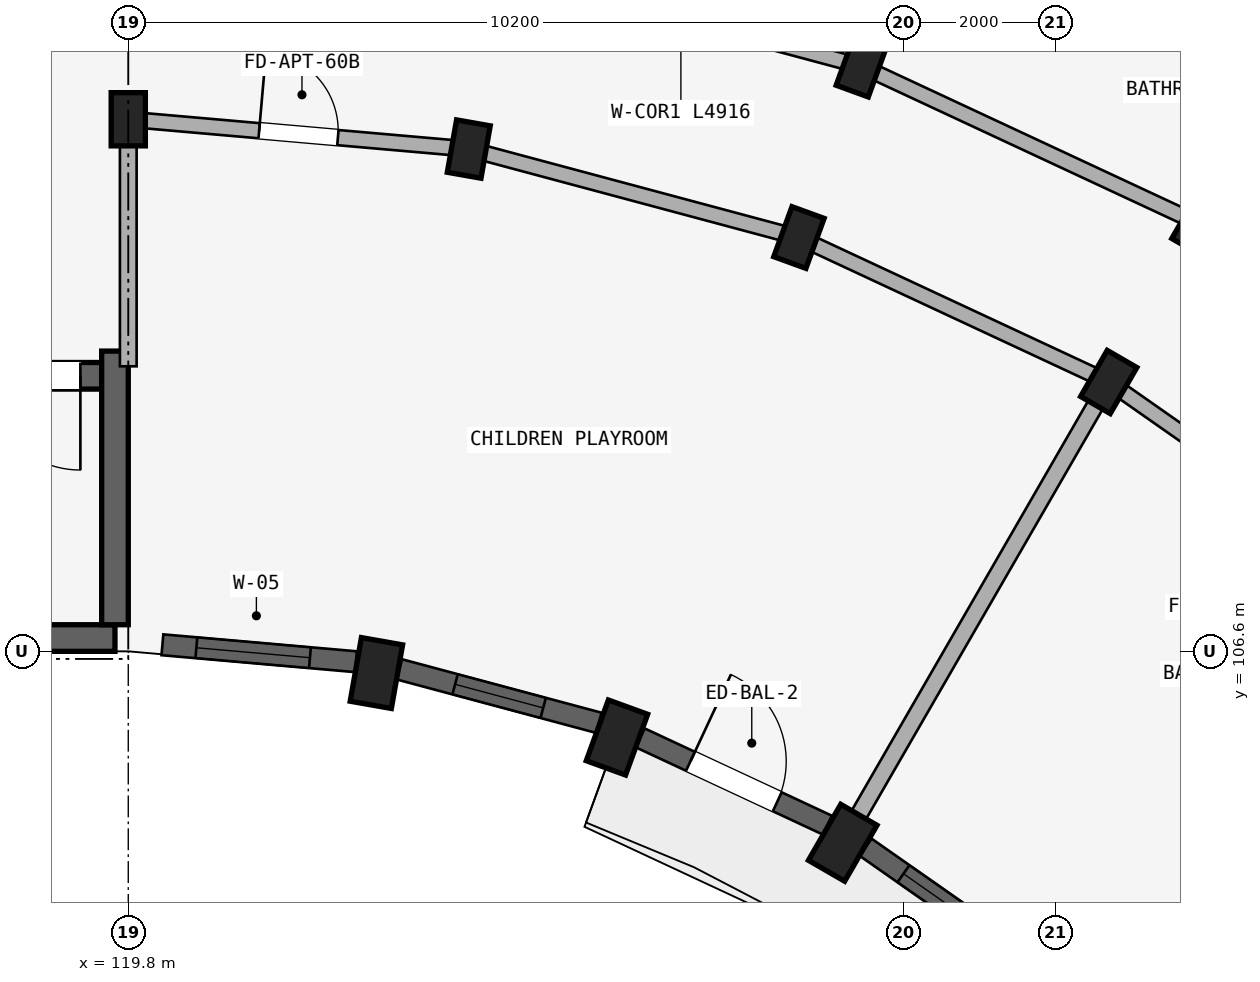
"""IFC4 building model, lengths in metres.
Left out: names, types, materials, properties, quantities, classifications, styles, units other than length and angle.
Written with IfcOpenShell. Run it as: python <this file> out.ifc"""

import sys

from ifc_helpers import new_model, si_unit, direction, frame, frame_2d, origin, origin_2d, place, context, subcontext, project, spatial, rectangle, extrude, element, fill, save


model = new_model("IFC4")
c1 = context("Model", 3, precision=1e-05, world=origin(), true_north=direction((0.0, 1.0)))
c2 = subcontext(c1, "Body", "Model", "MODEL_VIEW")
j1 = project(units=[si_unit("LENGTHUNIT", "METRE"), si_unit("PLANEANGLEUNIT", "RADIAN")], contexts=[c1])
p1 = place(None, origin())
s1 = spatial("IfcSite", under=j1, at=p1, CompositionType="ELEMENT")
p2 = place(p1, origin())
s2 = spatial("IfcBuilding", under=s1, at=p2, CompositionType="ELEMENT")
p3 = place(p2, frame((0.0, 0.0, 15.0)))
s3 = spatial("IfcBuildingStorey", under=s2, at=p3, CompositionType="ELEMENT", Elevation=15.0)
p4 = place(p3, frame((119.625, 106.775, 0.0), z_axis=(0.0, 0.0, 1.0), x_axis=(-1.0, 0.0, 0.0)))
e1 = element("IfcWall", 1, at=p4, inside=s3, PredefinedType="SHEAR", context=c2, shape_type="SweptSolid", body=[
    extrude(rectangle(XDim=8.25, YDim=0.35, at=frame_2d((4.125, 0.0))), origin(), (0.0, 0.0, 1.0), 2.93),
])
p5 = place(p3, frame((119.45, 110.225, 0.0), z_axis=(0.0, 0.0, 1.0), x_axis=(-1.0, 0.0, 0.0)))
e2 = element("IfcWall", 2, at=p5, inside=s3, PredefinedType="SHEAR", context=c2, shape_type="SweptSolid", body=[
    extrude(rectangle(XDim=7.9, YDim=0.35, at=frame_2d((3.95, 0.0))), origin(), (0.0, 0.0, 1.0), 2.93),
])
p6 = place(p5, frame((0.28, 0.0, 0.0)))
e3 = element("IfcOpeningElement", 3, at=p6, cuts=e2, PredefinedType="OPENING", context=c2, shape_type="SweptSolid", body=[
    extrude(rectangle(XDim=1.24, YDim=2.15, at=frame_2d((0.62, 1.075))), frame((0.0, 0.185, 0.0), z_axis=(0.0, -1.0, 0.0), x_axis=(1.0, 0.0, 0.0)), (0.0, 0.0, 1.0), 0.37),
])
p7 = place(p3, frame((119.625, 106.95, 0.0), z_axis=(0.0, 0.0, 1.0), x_axis=(0.0, 1.0, 0.0)))
e4 = element("IfcWall", 4, at=p7, inside=s3, PredefinedType="SHEAR", context=c2, shape_type="SweptSolid", body=[
    extrude(rectangle(XDim=3.6, YDim=0.35, at=frame_2d((1.8, 0.0))), origin(), (0.0, 0.0, 1.0), 2.93),
])
p8 = place(p3, frame((119.8, 113.6, 0.0), z_axis=(0.0, 0.0, 1.0), x_axis=(1.0, 0.0, 0.0)))
e5 = element("IfcColumn", 5, at=p8, inside=s3, PredefinedType="COLUMN", context=c2, shape_type="SweptSolid", body=[
    extrude(rectangle(XDim=0.45, YDim=0.7, at=origin_2d()), origin(), (0.0, 0.0, 1.0), 2.93),
])
p9 = place(p3, frame((123.065, 106.314, 0.0), z_axis=(0.0, 0.0, 1.0), x_axis=(-0.984807753012, 0.173648177667, 0.0)))
e6 = element("IfcColumn", 6, at=p9, inside=s3, PredefinedType="COLUMN", context=c2, shape_type="SweptSolid", body=[
    extrude(rectangle(XDim=0.55, YDim=0.85, at=origin_2d()), origin(), (0.0, 0.0, 1.0), 2.93),
])
p10 = place(p3, frame((124.28, 113.208, 0.0), z_axis=(0.0, 0.0, 1.0), x_axis=(-0.984807753012, 0.173648177667, 0.0)))
e7 = element("IfcColumn", 7, at=p10, inside=s3, PredefinedType="COLUMN", context=c2, shape_type="SweptSolid", body=[
    extrude(rectangle(XDim=0.45, YDim=0.7, at=origin_2d()), origin(), (0.0, 0.0, 1.0), 2.93),
])
p11 = place(p3, frame((126.23, 105.466, 0.0), z_axis=(0.0, 0.0, 1.0), x_axis=(-0.939692620786, 0.342020143326, 0.0)))
e8 = element("IfcColumn", 8, at=p11, inside=s3, PredefinedType="COLUMN", context=c2, shape_type="SweptSolid", body=[
    extrude(rectangle(XDim=0.55, YDim=0.85, at=origin_2d()), origin(), (0.0, 0.0, 1.0), 2.93),
])
for number, where, z_axis, x_axis in (
    (9, (128.624, 112.044, 0.0), (0.0, 0.0, 1.0), (-0.94, 0.342, 0.0)),
    (10, (129.445, 114.299, 0.0), (0.0, 0.0, 1.0), (-0.94, 0.342, 0.0)),
):
    element("IfcColumn", number, at=place(p3, frame(where, z_axis=z_axis, x_axis=x_axis)), inside=s3, PredefinedType="COLUMN", context=c2, shape_type="SweptSolid", body=[
        extrude(rectangle(XDim=0.45, YDim=0.7, at=origin_2d()), origin(), (0.0, 0.0, 1.0), 2.93),
    ])
p12 = place(p3, frame((129.2, 104.081, 0.0), z_axis=(0.0, 0.0, 1.0), x_axis=(-0.866025403784, 0.5, 0.0)))
e11 = element("IfcColumn", 11, at=p12, inside=s3, PredefinedType="COLUMN", context=c2, shape_type="SweptSolid", body=[
    extrude(rectangle(XDim=0.55, YDim=0.85, at=origin_2d()), origin(), (0.0, 0.0, 1.0), 2.93),
])
for number, where, z_axis, x_axis in (
    (12, (132.7, 110.144, 0.0), (0.0, 0.0, 1.0), (-0.866, 0.5, 0.0)),
    (13, (133.9, 112.222, 0.0), (0.0, 0.0, 1.0), (-0.866, 0.5, 0.0)),
):
    element("IfcColumn", number, at=place(p3, frame(where, z_axis=z_axis, x_axis=x_axis)), inside=s3, PredefinedType="COLUMN", context=c2, shape_type="SweptSolid", body=[
        extrude(rectangle(XDim=0.45, YDim=0.7, at=origin_2d()), origin(), (0.0, 0.0, 1.0), 2.93),
    ])
p13 = place(p3, frame((119.8, 113.6, 0.0), z_axis=(0.0, 0.0, 1.0), x_axis=(0.996191949488, -0.087187153726, 0.0)))
e14 = element("IfcWall", 14, at=p13, inside=s3, PredefinedType="STANDARD", context=c2, shape_type="SweptSolid", body=[
    extrude(rectangle(XDim=4.497, YDim=0.2, at=frame_2d((2.249, 0.0))), origin(), (0.0, 0.0, 1.0), 2.372),
])
p14 = place(p13, frame((1.729, 0.0, 0.0)))
e15 = element("IfcOpeningElement", 15, at=p14, cuts=e14, PredefinedType="OPENING", context=c2, shape_type="SweptSolid", body=[
    extrude(rectangle(XDim=1.04, YDim=2.15, at=frame_2d((0.52, 1.075))), frame((0.0, 0.11, 0.0), z_axis=(0.0, -1.0, 0.0), x_axis=(1.0, 0.0, 0.0)), (0.0, 0.0, 1.0), 0.22),
])
p15 = place(p3, frame((124.28, 113.208, 0.0), z_axis=(0.0, 0.0, 1.0), x_axis=(0.965934240054, -0.258787642463, 0.0)))
e16 = element("IfcWall", 16, at=p15, inside=s3, PredefinedType="STANDARD", context=c2, shape_type="SweptSolid", body=[
    extrude(rectangle(XDim=4.497, YDim=0.2, at=frame_2d((2.249, 0.0))), origin(), (0.0, 0.0, 1.0), 2.372),
])
p16 = place(p3, frame((124.697, 115.572, 0.0), z_axis=(0.0, 0.0, 1.0), x_axis=(0.965930095386, -0.258803112091, 0.0)))
e17 = element("IfcWall", 17, at=p16, inside=s3, PredefinedType="STANDARD", context=c2, shape_type="SweptSolid", body=[
    extrude(rectangle(XDim=4.916, YDim=0.2, at=frame_2d((2.458, 0.0))), origin(), (0.0, 0.0, 1.0), 2.372),
])
p17 = place(p3, frame((128.624, 112.044, 0.0), z_axis=(0.0, 0.0, 1.0), x_axis=(0.906307919131, -0.422617978463, 0.0)))
e18 = element("IfcWall", 18, at=p17, inside=s3, PredefinedType="STANDARD", context=c2, shape_type="SweptSolid", body=[
    extrude(rectangle(XDim=4.497, YDim=0.2, at=frame_2d((2.249, 0.0))), origin(), (0.0, 0.0, 1.0), 2.372),
])
p18 = place(p3, frame((129.445, 114.299, 0.0), z_axis=(0.0, 0.0, 1.0), x_axis=(0.906302381024, -0.422629854778, 0.0)))
e19 = element("IfcWall", 19, at=p18, inside=s3, PredefinedType="STANDARD", context=c2, shape_type="SweptSolid", body=[
    extrude(rectangle(XDim=4.915, YDim=0.2, at=frame_2d((2.458, 0.0))), origin(), (0.0, 0.0, 1.0), 2.372),
])
p19 = place(p3, frame((132.7, 110.144, 0.0), z_axis=(0.0, 0.0, 1.0), x_axis=(0.819155404658, -0.573571637217, 0.0)))
e20 = element("IfcWall", 20, at=p19, inside=s3, PredefinedType="STANDARD", context=c2, shape_type="SweptSolid", body=[
    extrude(rectangle(XDim=4.497, YDim=0.2, at=frame_2d((2.249, 0.0))), origin(), (0.0, 0.0, 1.0), 2.372),
])
p20 = place(p19, frame((1.709, 0.0, 0.0)))
e21 = element("IfcOpeningElement", 21, at=p20, cuts=e20, PredefinedType="OPENING", context=c2, shape_type="SweptSolid", body=[
    extrude(rectangle(XDim=1.08, YDim=2.15, at=frame_2d((0.54, 1.075))), frame((0.0, 0.11, 0.0), z_axis=(0.0, -1.0, 0.0), x_axis=(1.0, 0.0, 0.0)), (0.0, 0.0, 1.0), 0.22),
])
p21 = place(p3, frame((119.8, 110.35, 0.0), z_axis=(0.0, 0.0, 1.0), x_axis=(0.0, 1.0, 0.0)))
e22 = element("IfcWall", 22, at=p21, inside=s3, PredefinedType="STANDARD", context=c2, shape_type="SweptSolid", body=[
    extrude(rectangle(XDim=3.2, YDim=0.22, at=frame_2d((1.6, 0.0))), origin(), (0.0, 0.0, 1.0), 2.372),
])
p22 = place(p3, frame((129.479, 114.393, 0.0), z_axis=(0.0, 0.0, 1.0), x_axis=(0.342022120477, 0.939691901159, 0.0)))
e23 = element("IfcWall", 23, at=p22, inside=s3, PredefinedType="PARTITIONING", context=c2, shape_type="SweptSolid", body=[
    extrude(rectangle(XDim=17.42, YDim=0.15, at=frame_2d((8.71, 0.0))), origin(), (0.0, 0.0, 1.0), 2.372),
])
p23 = place(p22, frame((7.5, 0.0, 0.0)))
e24 = element("IfcOpeningElement", 24, at=p23, cuts=e23, PredefinedType="OPENING", context=c2, shape_type="SweptSolid", body=[
    extrude(rectangle(XDim=0.8, YDim=2.1, at=frame_2d((0.4, 1.05))), frame((0.0, 0.085, 0.0), z_axis=(0.0, -1.0, 0.0), x_axis=(1.0, 0.0, 0.0)), (0.0, 0.0, 1.0), 0.17),
])
p24 = place(p3, frame((129.3, 104.254, 0.0), z_axis=(0.0, 0.0, 1.0), x_axis=(0.499997969693, 0.866026575979, 0.0)))
e25 = element("IfcWall", 25, at=p24, inside=s3, PredefinedType="STANDARD", context=c2, shape_type="SweptSolid", body=[
    extrude(rectangle(XDim=6.75, YDim=0.22, at=frame_2d((3.375, 0.0))), origin(), (0.0, 0.0, 1.0), 2.372),
])
p25 = place(p3, frame((120.249, 106.686, 0.0), z_axis=(0.0, 0.0, 1.0), x_axis=(0.996194235595, -0.08716102895, 0.0)))
e26 = element("IfcWall", 26, at=p25, inside=s3, PredefinedType="STANDARD", context=c2, shape_type="SweptSolid", body=[
    extrude(rectangle(XDim=2.557, YDim=0.275, at=frame_2d((1.279, 0.0))), origin(), (0.0, 0.0, 1.0), 2.472),
])
p26 = place(p25, frame((0.448, 0.0, 0.622)))
e27 = element("IfcOpeningElement", 27, at=p26, cuts=e26, PredefinedType="OPENING", context=c2, shape_type="SweptSolid", body=[
    extrude(rectangle(XDim=1.5, YDim=1.65, at=frame_2d((0.75, 0.825))), frame((0.0, 0.147, 0.0), z_axis=(0.0, -1.0, 0.0), x_axis=(1.0, 0.0, 0.0)), (0.0, 0.0, 1.0), 0.295),
])
p27 = place(p3, frame((123.367, 106.363, 0.0), z_axis=(0.0, 0.0, 1.0), x_axis=(0.965925595341, -0.258819907011, 0.0)))
e28 = element("IfcWall", 28, at=p27, inside=s3, PredefinedType="STANDARD", context=c2, shape_type="SweptSolid", body=[
    extrude(rectangle(XDim=2.718, YDim=0.275, at=frame_2d((1.359, 0.0))), origin(), (0.0, 0.0, 1.0), 2.472),
])
p28 = place(p27, frame((0.759, 0.0, 0.772)))
e29 = element("IfcOpeningElement", 29, at=p28, cuts=e28, PredefinedType="OPENING", context=c2, shape_type="SweptSolid", body=[
    extrude(rectangle(XDim=1.2, YDim=1.5, at=frame_2d((0.6, 0.75))), frame((0.0, 0.147, 0.0), z_axis=(0.0, -1.0, 0.0), x_axis=(1.0, 0.0, 0.0)), (0.0, 0.0, 1.0), 0.295),
])
p29 = place(p3, frame((126.536, 105.461, 0.0), z_axis=(0.0, 0.0, 1.0), x_axis=(0.906311629168, -0.422610022166, 0.0)))
e30 = element("IfcWall", 30, at=p29, inside=s3, PredefinedType="STANDARD", context=c2, shape_type="SweptSolid", body=[
    extrude(rectangle(XDim=2.718, YDim=0.275, at=frame_2d((1.359, 0.0))), origin(), (0.0, 0.0, 1.0), 2.472),
])
p30 = place(p29, frame((0.729, 0.0, 0.0)))
e31 = element("IfcOpeningElement", 31, at=p30, cuts=e30, PredefinedType="OPENING", context=c2, shape_type="SweptSolid", body=[
    extrude(rectangle(XDim=1.26, YDim=2.15, at=frame_2d((0.63, 1.075))), frame((0.0, 0.147, 0.0), z_axis=(0.0, -1.0, 0.0), x_axis=(1.0, 0.0, 0.0)), (0.0, 0.0, 1.0), 0.295),
])
p31 = place(p3, frame((129.501, 104.023, 0.0), z_axis=(0.0, 0.0, 1.0), x_axis=(0.81917282593, -0.573546755948, 0.0)))
e32 = element("IfcWall", 32, at=p31, inside=s3, PredefinedType="STANDARD", context=c2, shape_type="SweptSolid", body=[
    extrude(rectangle(XDim=2.718, YDim=0.275, at=frame_2d((1.359, 0.0))), origin(), (0.0, 0.0, 1.0), 2.472),
])
p32 = place(p31, frame((0.609, 0.0, 0.622)))
e33 = element("IfcOpeningElement", 33, at=p32, cuts=e32, PredefinedType="OPENING", context=c2, shape_type="SweptSolid", body=[
    extrude(rectangle(XDim=1.5, YDim=1.65, at=frame_2d((0.75, 0.825))), frame((0.0, 0.147, 0.0), z_axis=(0.0, -1.0, 0.0), x_axis=(1.0, 0.0, 0.0)), (0.0, 0.0, 1.0), 0.295),
])
p33 = place(p26, origin())
e34 = element("IfcWindow", 34, at=p33, inside=s3, PartitioningType="DOUBLE_PANEL_VERTICAL", PredefinedType="WINDOW", context=c2, shape_type="SweptSolid", body=[
    extrude(rectangle(XDim=1.5, YDim=1.65, at=frame_2d((0.75, 0.825))), frame((0.0, 0.03, 0.0), z_axis=(0.0, -1.0, 0.0), x_axis=(1.0, 0.0, 0.0)), (0.0, 0.0, 1.0), 0.06),
])
fill(e27, e34)
p34 = place(p28, origin())
e35 = element("IfcWindow", 35, at=p34, inside=s3, PartitioningType="SINGLE_PANEL", PredefinedType="WINDOW", context=c2, shape_type="SweptSolid", body=[
    extrude(rectangle(XDim=1.2, YDim=1.5, at=frame_2d((0.6, 0.75))), frame((0.0, 0.03, 0.0), z_axis=(0.0, -1.0, 0.0), x_axis=(1.0, 0.0, 0.0)), (0.0, 0.0, 1.0), 0.06),
])
fill(e29, e35)
p35 = place(p32, origin())
e36 = element("IfcWindow", 36, at=p35, inside=s3, PartitioningType="DOUBLE_PANEL_VERTICAL", PredefinedType="WINDOW", context=c2, shape_type="SweptSolid", body=[
    extrude(rectangle(XDim=1.5, YDim=1.65, at=frame_2d((0.75, 0.825))), frame((0.0, 0.03, 0.0), z_axis=(0.0, -1.0, 0.0), x_axis=(1.0, 0.0, 0.0)), (0.0, 0.0, 1.0), 0.06),
])
fill(e33, e36)
p36 = place(p6, origin())
e37 = element("IfcDoor", 37, at=p36, inside=s3, OperationType="SINGLE_SWING_LEFT", PredefinedType="DOOR", context=c2, shape_type="SweptSolid", body=[
    extrude(rectangle(XDim=1.24, YDim=2.15, at=frame_2d((0.62, 1.075))), frame((0.0, 0.025, 0.0), z_axis=(0.0, -1.0, 0.0), x_axis=(1.0, 0.0, 0.0)), (0.0, 0.0, 1.0), 0.05),
])
fill(e3, e37)
p37 = place(p14, frame((1.04, 0.0, 0.0), z_axis=(0.0, 0.0, 1.0), x_axis=(-1.0, 0.0, 0.0)))
e38 = element("IfcDoor", 38, at=p37, inside=s3, OperationType="SINGLE_SWING_RIGHT", PredefinedType="DOOR", context=c2, shape_type="SweptSolid", body=[
    extrude(rectangle(XDim=1.04, YDim=2.15, at=frame_2d((0.52, 1.075))), frame((0.0, 0.025, 0.0), z_axis=(0.0, -1.0, 0.0), x_axis=(1.0, 0.0, 0.0)), (0.0, 0.0, 1.0), 0.05),
])
fill(e15, e38)
p38 = place(p30, frame((1.26, 0.0, 0.0), z_axis=(0.0, 0.0, 1.0), x_axis=(-1.0, 0.0, 0.0)))
e39 = element("IfcDoor", 39, at=p38, inside=s3, OperationType="SINGLE_SWING_RIGHT", PredefinedType="DOOR", context=c2, shape_type="SweptSolid", body=[
    extrude(rectangle(XDim=1.26, YDim=2.15, at=frame_2d((0.63, 1.075))), frame((0.0, 0.025, 0.0), z_axis=(0.0, -1.0, 0.0), x_axis=(1.0, 0.0, 0.0)), (0.0, 0.0, 1.0), 0.05),
])
fill(e31, e39)
save(model, sys.argv[1])
